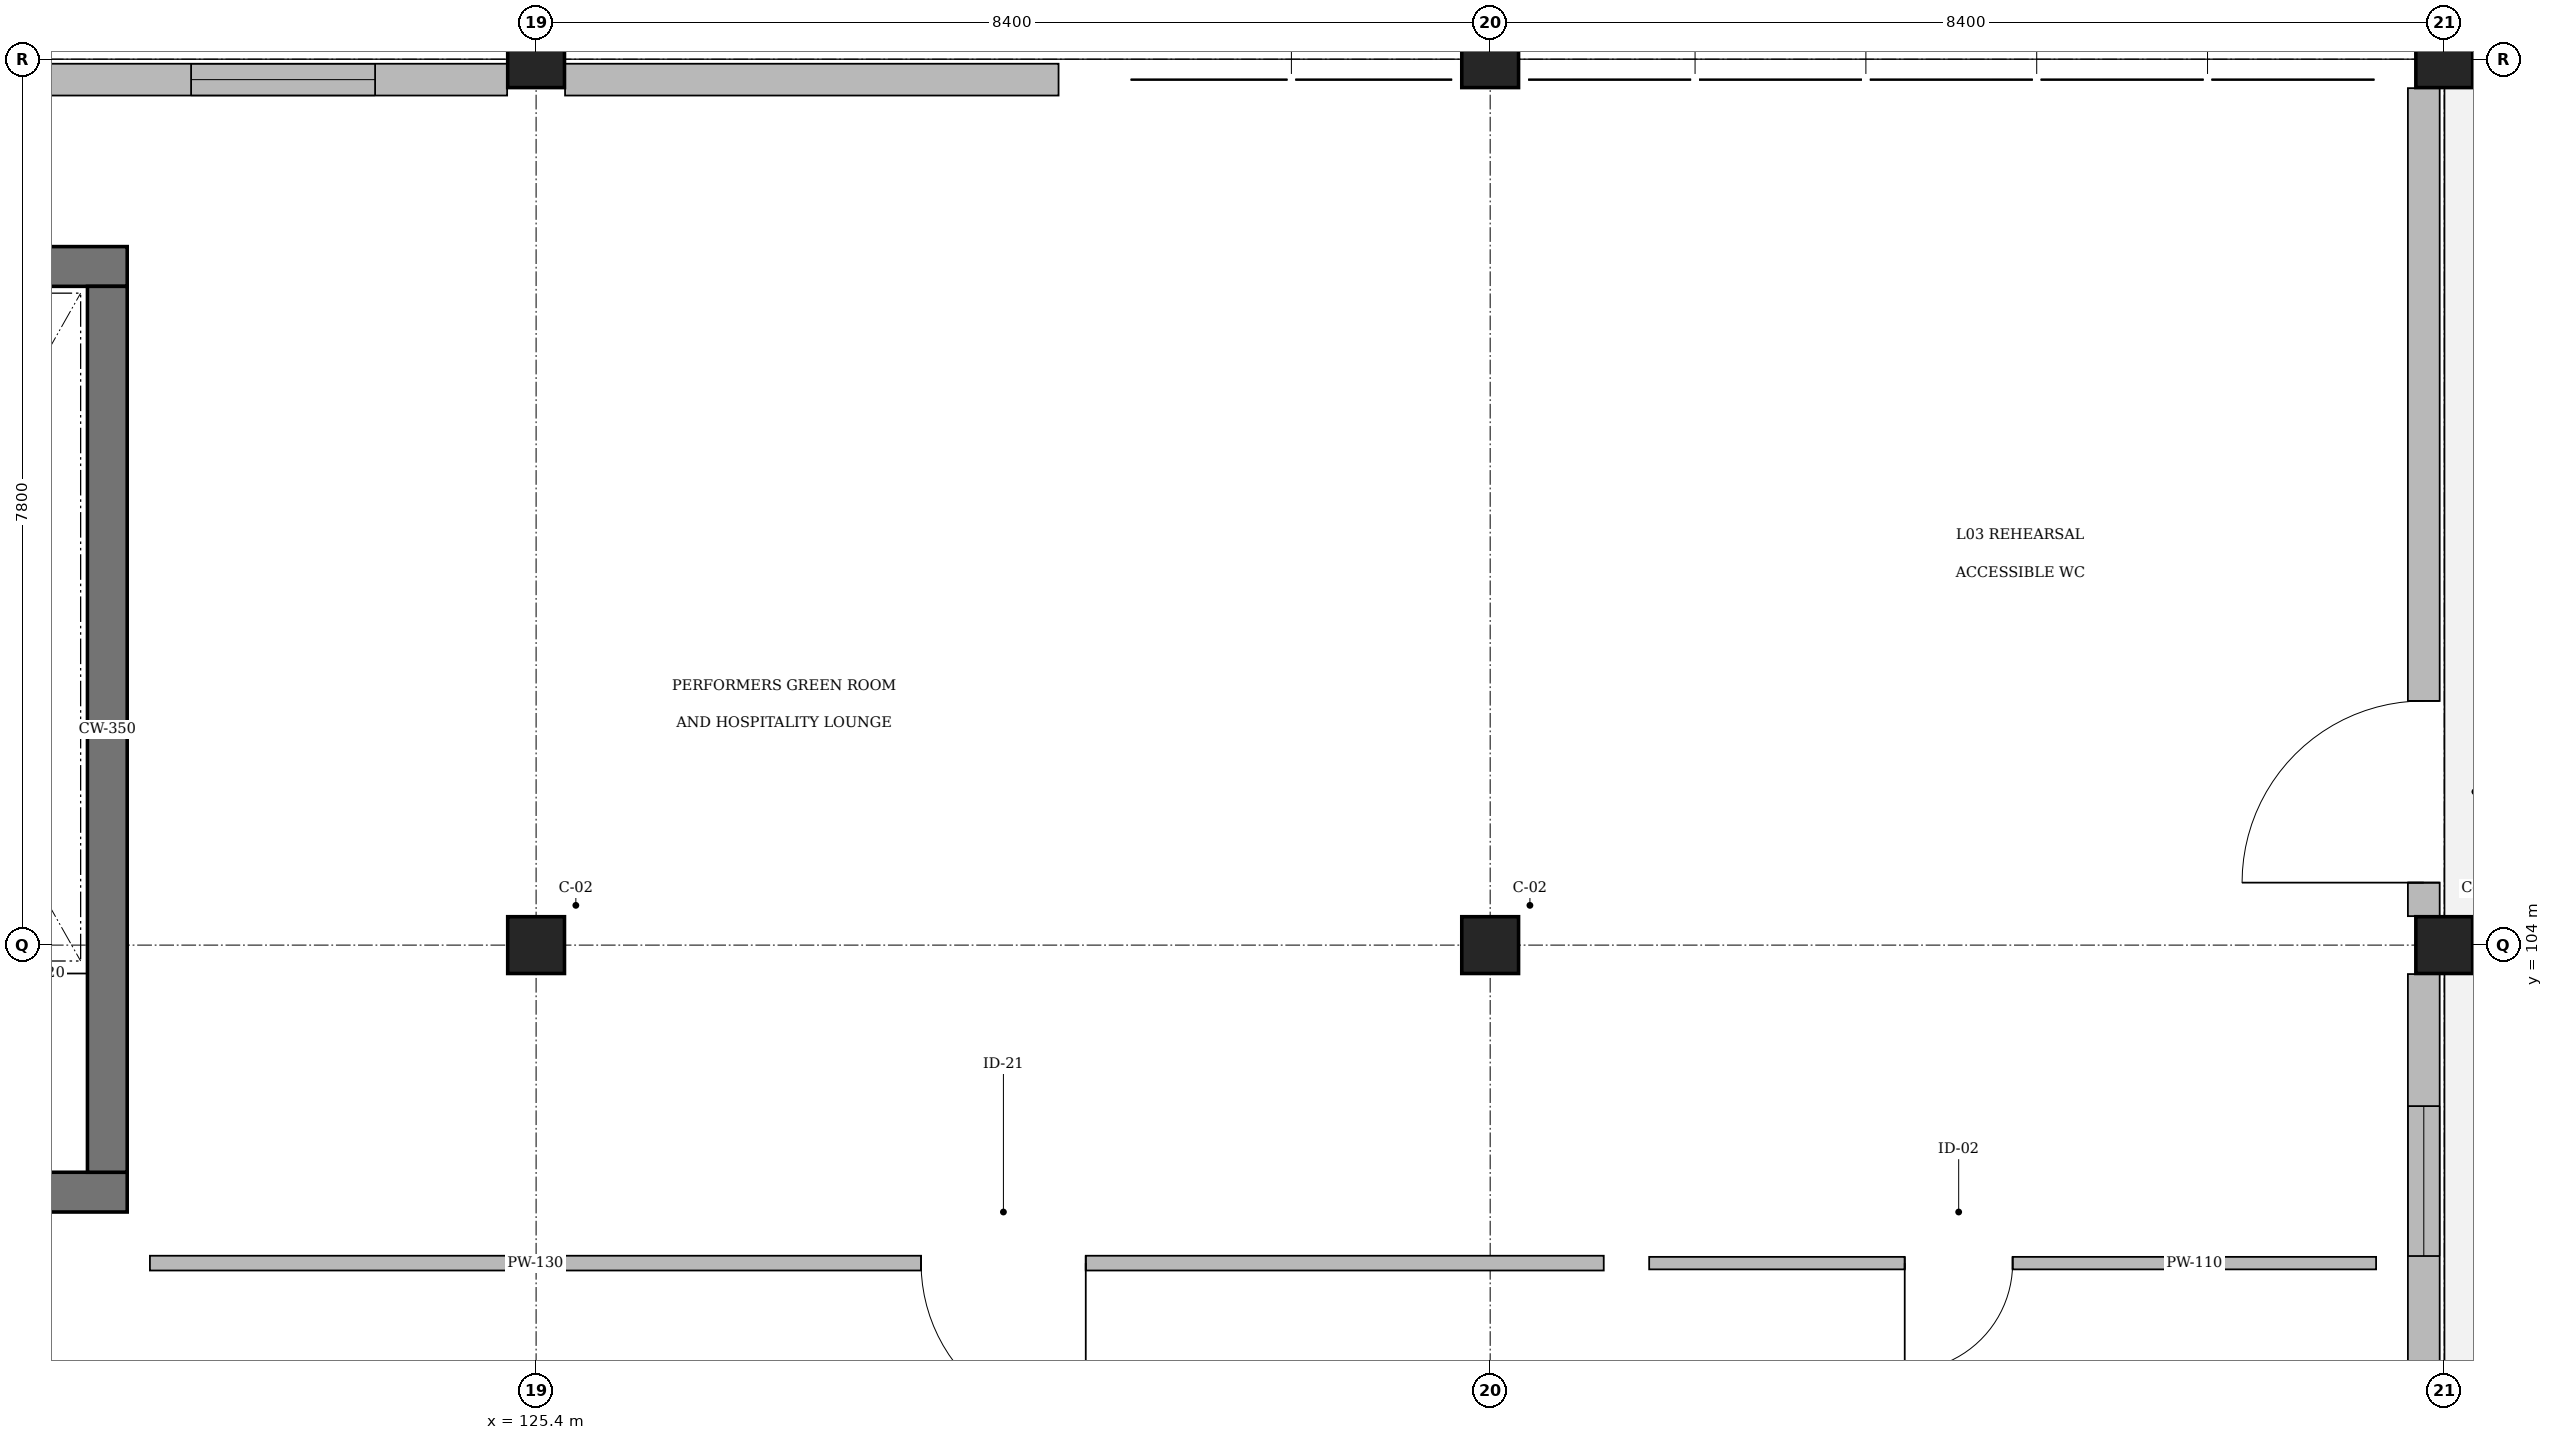
"""IFC4 building model, lengths in metres.
Left out: names, types, materials, properties, quantities, classifications, styles, units other than length and angle.
Written with IfcOpenShell. Run it as: python <this file> out.ifc"""

import sys

from ifc_helpers import new_model, si_unit, direction, frame, frame_2d, origin, origin_2d, place, context, subcontext, project, spatial, rectangle, extrude, element, fill, save


model = new_model("IFC4")
c1 = context("Model", 3, precision=1e-05, world=origin(), true_north=direction((0.0, 1.0)))
c2 = subcontext(c1, "Body", "Model", "MODEL_VIEW")
j1 = project(units=[si_unit("LENGTHUNIT", "METRE"), si_unit("PLANEANGLEUNIT", "RADIAN")], contexts=[c1])
p1 = place(None, origin())
s1 = spatial("IfcSite", under=j1, at=p1, CompositionType="ELEMENT")
p2 = place(p1, origin())
s2 = spatial("IfcBuilding", under=s1, at=p2, CompositionType="ELEMENT")
p3 = place(p2, frame((0.0, 0.0, 13.2)))
s3 = spatial("IfcBuildingStorey", under=s2, at=p3, CompositionType="ELEMENT", Elevation=13.2)
for number, where, z_axis, x_axis in (
    (1, (125.4, 104.0, 0.0), (0.0, 0.0, 1.0), (1.0, 0.0, 0.0)),
    (2, (125.4, 111.8, 0.0), (0.0, 0.0, 1.0), (1.0, 0.0, 0.0)),
    (3, (133.8, 104.0, 0.0), (0.0, 0.0, 1.0), (1.0, 0.0, 0.0)),
    (4, (133.8, 111.8, 0.0), (0.0, 0.0, 1.0), (1.0, 0.0, 0.0)),
    (5, (142.2, 104.0, 0.0), (0.0, 0.0, 1.0), (1.0, 0.0, 0.0)),
    (6, (142.2, 111.8, 0.0), (0.0, 0.0, 1.0), (1.0, 0.0, 0.0)),
):
    element("IfcColumn", number, at=place(p3, frame(where, z_axis=z_axis, x_axis=x_axis)), inside=s3, PredefinedType="COLUMN", context=c2, shape_type="SweptSolid", body=[
        extrude(rectangle(XDim=0.5, YDim=0.5, at=origin_2d()), origin(), (0.0, 0.0, 1.0), 3.71),
    ])
p4 = place(p3, frame((121.8, 101.825, 0.0), z_axis=(0.0, 0.0, 1.0), x_axis=(-1.0, 0.0, 0.0)))
e7 = element("IfcWall", 7, at=p4, inside=s3, PredefinedType="SOLIDWALL", context=c2, shape_type="SweptSolid", body=[
    extrude(rectangle(XDim=4.15, YDim=0.35, at=frame_2d((2.075, 0.0))), origin(), (0.0, 0.0, 1.0), 3.6),
])
p5 = place(p4, frame((1.525, 0.0, 0.0)))
e8 = element("IfcOpeningElement", 8, at=p5, cuts=e7, PredefinedType="OPENING", context=c2, shape_type="SweptSolid", body=[
    extrude(rectangle(XDim=1.1, YDim=2.15, at=frame_2d((0.55, 1.075))), frame((0.0, 0.195, 0.0), z_axis=(0.0, -1.0, 0.0), x_axis=(1.0, 0.0, 0.0)), (0.0, 0.0, 1.0), 0.39),
])
p6 = place(p3, frame((117.65, 109.975, 0.0), z_axis=(0.0, 0.0, 1.0), x_axis=(1.0, 0.0, 0.0)))
e9 = element("IfcWall", 9, at=p6, inside=s3, PredefinedType="SOLIDWALL", context=c2, shape_type="SweptSolid", body=[
    extrude(rectangle(XDim=4.15, YDim=0.35, at=frame_2d((2.075, 0.0))), origin(), (0.0, 0.0, 1.0), 3.6),
])
p7 = place(p3, frame((121.625, 109.8, 0.0), z_axis=(0.0, 0.0, 1.0), x_axis=(0.0, -1.0, 0.0)))
e10 = element("IfcWall", 10, at=p7, inside=s3, PredefinedType="SOLIDWALL", context=c2, shape_type="SweptSolid", body=[
    extrude(rectangle(XDim=7.8, YDim=0.35, at=frame_2d((3.9, 0.0))), origin(), (0.0, 0.0, 1.0), 3.6),
])
p8 = place(p3, frame((117.255, 111.62, 0.0), z_axis=(0.0, 0.0, 1.0), x_axis=(1.0, 0.0, 0.0)))
e11 = element("IfcWall", 11, at=p8, inside=s3, PredefinedType="SOLIDWALL", context=c2, shape_type="SweptSolid", body=[
    extrude(rectangle(XDim=7.89, YDim=0.28, at=frame_2d((3.945, 0.0))), origin(), (0.0, 0.0, 1.0), 2.993),
])
p9 = place(p8, frame((1.163, 0.0, 0.95)))
e12 = element("IfcOpeningElement", 12, at=p9, cuts=e11, PredefinedType="OPENING", context=c2, shape_type="SweptSolid", body=[
    extrude(rectangle(XDim=1.62, YDim=1.75, at=frame_2d((0.81, 0.875))), frame((0.0, 0.16, 0.0), z_axis=(0.0, -1.0, 0.0), x_axis=(1.0, 0.0, 0.0)), (0.0, 0.0, 1.0), 0.32),
])
p10 = place(p8, frame((5.107, 0.0, 0.95)))
e13 = element("IfcOpeningElement", 13, at=p10, cuts=e11, PredefinedType="OPENING", context=c2, shape_type="SweptSolid", body=[
    extrude(rectangle(XDim=1.62, YDim=1.75, at=frame_2d((0.81, 0.875))), frame((0.0, 0.16, 0.0), z_axis=(0.0, -1.0, 0.0), x_axis=(1.0, 0.0, 0.0)), (0.0, 0.0, 1.0), 0.32),
])
p11 = place(p3, frame((125.655, 111.62, 0.0), z_axis=(0.0, 0.0, 1.0), x_axis=(1.0, 0.0, 0.0)))
e14 = element("IfcWall", 14, at=p11, inside=s3, PredefinedType="SOLIDWALL", context=c2, shape_type="SweptSolid", body=[
    extrude(rectangle(XDim=4.345, YDim=0.28, at=frame_2d((2.172, 0.0))), origin(), (0.0, 0.0, 1.0), 2.993),
])
p12 = place(p3, frame((142.02, 96.455, 0.0), z_axis=(0.0, 0.0, 1.0), x_axis=(0.0, 1.0, 0.0)))
e15 = element("IfcWall", 15, at=p12, inside=s3, PredefinedType="SOLIDWALL", context=c2, shape_type="SweptSolid", body=[
    extrude(rectangle(XDim=7.29, YDim=0.28, at=frame_2d((3.645, 0.0))), origin(), (0.0, 0.0, 1.0), 3.283),
])
p13 = place(p12, frame((1.163, 0.0, 0.95)))
e16 = element("IfcOpeningElement", 16, at=p13, cuts=e15, PredefinedType="OPENING", context=c2, shape_type="SweptSolid", body=[
    extrude(rectangle(XDim=1.32, YDim=1.65, at=frame_2d((0.66, 0.825))), frame((0.0, 0.16, 0.0), z_axis=(0.0, -1.0, 0.0), x_axis=(1.0, 0.0, 0.0)), (0.0, 0.0, 1.0), 0.32),
])
p14 = place(p12, frame((4.808, 0.0, 0.95)))
e17 = element("IfcOpeningElement", 17, at=p14, cuts=e15, PredefinedType="OPENING", context=c2, shape_type="SweptSolid", body=[
    extrude(rectangle(XDim=1.32, YDim=1.65, at=frame_2d((0.66, 0.825))), frame((0.0, 0.16, 0.0), z_axis=(0.0, -1.0, 0.0), x_axis=(1.0, 0.0, 0.0)), (0.0, 0.0, 1.0), 0.32),
])
p15 = place(p3, frame((142.02, 104.255, 0.0), z_axis=(0.0, 0.0, 1.0), x_axis=(0.0, 1.0, 0.0)))
e18 = element("IfcWall", 18, at=p15, inside=s3, PredefinedType="SOLIDWALL", context=c2, shape_type="SweptSolid", body=[
    extrude(rectangle(XDim=7.29, YDim=0.28, at=frame_2d((3.645, 0.0))), origin(), (0.0, 0.0, 1.0), 3.283),
])
p16 = place(p15, frame((0.295, 0.0, 0.0)))
e19 = element("IfcOpeningElement", 19, at=p16, cuts=e18, PredefinedType="OPENING", context=c2, shape_type="SweptSolid", body=[
    extrude(rectangle(XDim=1.6, YDim=2.2, at=frame_2d((0.8, 1.1))), frame((0.0, 0.16, 0.0), z_axis=(0.0, -1.0, 0.0), x_axis=(1.0, 0.0, 0.0)), (0.0, 0.0, 1.0), 0.32),
])
p17 = place(p3, frame((134.8, 101.2, 0.0), z_axis=(0.0, 0.0, 1.0), x_axis=(-1.0, 0.0, 0.0)))
e20 = element("IfcWall", 20, at=p17, inside=s3, PredefinedType="PARTITIONING", context=c2, shape_type="SweptSolid", body=[
    extrude(rectangle(XDim=12.8, YDim=0.13, at=frame_2d((6.4, 0.0))), origin(), (0.0, 0.0, 1.0), 3.66),
])
p18 = place(p17, frame((4.561, 0.0, 0.0)))
e21 = element("IfcOpeningElement", 21, at=p18, cuts=e20, PredefinedType="OPENING", context=c2, shape_type="SweptSolid", body=[
    extrude(rectangle(XDim=1.45, YDim=2.2, at=frame_2d((0.725, 1.1))), frame((0.0, 0.085, 0.0), z_axis=(0.0, -1.0, 0.0), x_axis=(1.0, 0.0, 0.0)), (0.0, 0.0, 1.0), 0.17),
])
p19 = place(p3, frame((141.6, 101.2, 0.0), z_axis=(0.0, 0.0, 1.0), x_axis=(-1.0, 0.0, 0.0)))
e22 = element("IfcWall", 22, at=p19, inside=s3, PredefinedType="PARTITIONING", context=c2, shape_type="SweptSolid", body=[
    extrude(rectangle(XDim=6.4, YDim=0.11, at=frame_2d((3.2, 0.0))), origin(), (0.0, 0.0, 1.0), 3.66),
])
p20 = place(p19, frame((3.2, 0.0, 0.0)))
e23 = element("IfcOpeningElement", 23, at=p20, cuts=e22, PredefinedType="OPENING", context=c2, shape_type="SweptSolid", body=[
    extrude(rectangle(XDim=0.95, YDim=2.1, at=frame_2d((0.475, 1.05))), frame((0.0, 0.075, 0.0), z_axis=(0.0, -1.0, 0.0), x_axis=(1.0, 0.0, 0.0)), (0.0, 0.0, 1.0), 0.15),
])
p21 = place(p10, origin())
e24 = element("IfcWindow", 24, at=p21, inside=s3, PartitioningType="SINGLE_PANEL", PredefinedType="WINDOW", context=c2, shape_type="SweptSolid", body=[
    extrude(rectangle(XDim=1.62, YDim=1.75, at=frame_2d((0.81, 0.875))), frame((0.0, 0.03, 0.0), z_axis=(0.0, -1.0, 0.0), x_axis=(1.0, 0.0, 0.0)), (0.0, 0.0, 1.0), 0.06),
])
fill(e13, e24)
p22 = place(p14, origin())
e25 = element("IfcWindow", 25, at=p22, inside=s3, PartitioningType="SINGLE_PANEL", PredefinedType="WINDOW", context=c2, shape_type="SweptSolid", body=[
    extrude(rectangle(XDim=1.32, YDim=1.65, at=frame_2d((0.66, 0.825))), frame((0.0, 0.03, 0.0), z_axis=(0.0, -1.0, 0.0), x_axis=(1.0, 0.0, 0.0)), (0.0, 0.0, 1.0), 0.06),
])
fill(e17, e25)
p23 = place(p16, origin())
e26 = element("IfcDoor", 26, at=p23, inside=s3, OperationType="SINGLE_SWING_LEFT", PredefinedType="DOOR", context=c2, shape_type="SweptSolid", body=[
    extrude(rectangle(XDim=1.6, YDim=2.2, at=frame_2d((0.8, 1.1))), frame((0.0, 0.025, 0.0), z_axis=(0.0, -1.0, 0.0), x_axis=(1.0, 0.0, 0.0)), (0.0, 0.0, 1.0), 0.05),
])
fill(e19, e26)
p24 = place(p18, origin())
e27 = element("IfcDoor", 27, at=p24, inside=s3, OperationType="DOUBLE_DOOR_SINGLE_SWING", PredefinedType="DOOR", context=c2, shape_type="SweptSolid", body=[
    extrude(rectangle(XDim=1.45, YDim=2.2, at=frame_2d((0.725, 1.1))), frame((0.0, 0.025, 0.0), z_axis=(0.0, -1.0, 0.0), x_axis=(1.0, 0.0, 0.0)), (0.0, 0.0, 1.0), 0.05),
])
fill(e21, e27)
p25 = place(p20, origin())
e28 = element("IfcDoor", 28, at=p25, inside=s3, OperationType="SINGLE_SWING_RIGHT", PredefinedType="DOOR", context=c2, shape_type="SweptSolid", body=[
    extrude(rectangle(XDim=0.95, YDim=2.1, at=frame_2d((0.475, 1.05))), frame((0.0, 0.025, 0.0), z_axis=(0.0, -1.0, 0.0), x_axis=(1.0, 0.0, 0.0)), (0.0, 0.0, 1.0), 0.05),
])
fill(e23, e28)
save(model, sys.argv[1])
